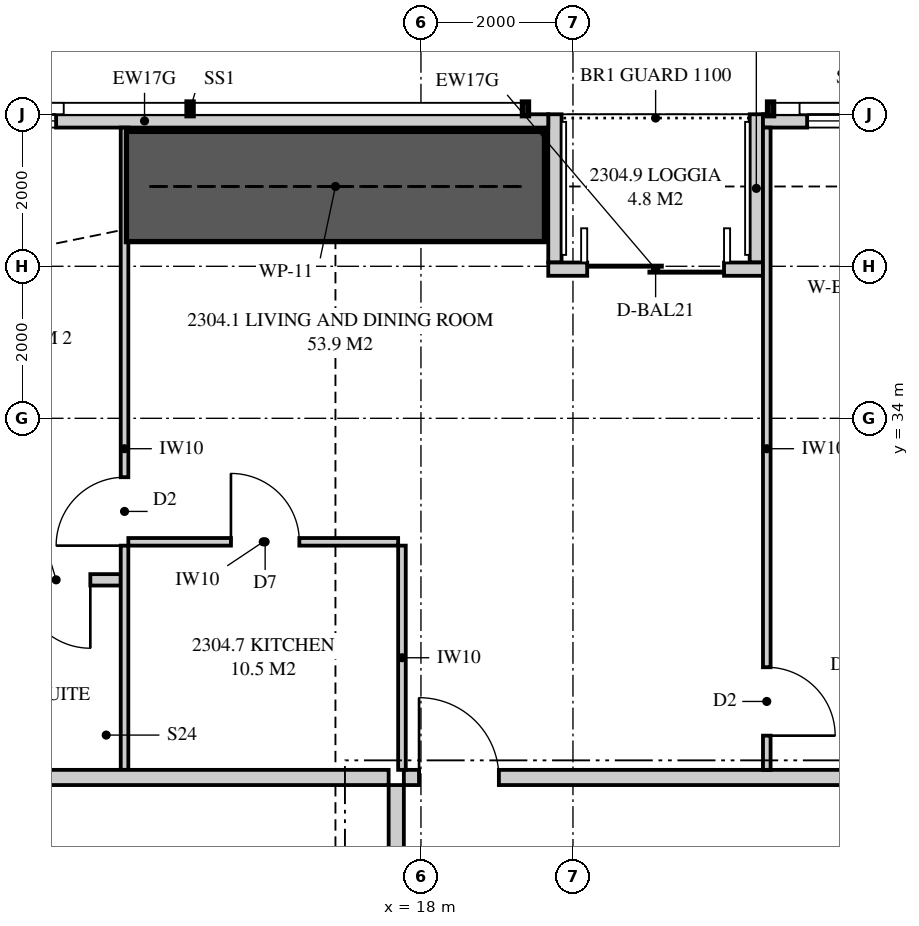
"""IFC4 building model, lengths in metres.
Left out: names, types, materials, properties, quantities, classifications, styles, units other than length and angle.
Written with IfcOpenShell. Run it as: python <this file> out.ifc"""

import sys

from ifc_helpers import new_model, si_unit, direction, frame, frame_2d, origin, place, context, subcontext, project, spatial, polyline, rectangle, outline, extrude, element, fill, save


model = new_model("IFC4")
c1 = context("Model", 3, precision=1e-05, world=origin(), true_north=direction((0.0, 1.0)))
c2 = subcontext(c1, "Body", "Model", "MODEL_VIEW")
j1 = project(units=[si_unit("LENGTHUNIT", "METRE"), si_unit("PLANEANGLEUNIT", "RADIAN")], contexts=[c1])
p1 = place(None, origin())
s1 = spatial("IfcSite", under=j1, at=p1, CompositionType="ELEMENT")
p2 = place(p1, origin())
s2 = spatial("IfcBuilding", under=s1, at=p2, CompositionType="ELEMENT")
p3 = place(p2, frame((0.0, 0.0, 88.1)))
s3 = spatial("IfcBuildingStorey", under=s2, at=p3, CompositionType="ELEMENT", Elevation=88.1)
p4 = place(p3, frame((30.675, 37.913, 0.0), z_axis=(0.0, 0.0, 1.0), x_axis=(-1.0, 0.0, 0.0)))
e1 = element("IfcWall", 1, at=p4, inside=s3, PredefinedType="SOLIDWALL", context=c2, shape_type="SweptSolid", body=[
    extrude(rectangle(XDim=8.175, YDim=0.175, at=frame_2d((4.087, 0.0))), origin(), (0.0, 0.0, 1.0), 2.15),
])
p5 = place(p4, frame((5.794, 0.0, 0.4)))
e2 = element("IfcOpeningElement", 2, at=p5, cuts=e1, PredefinedType="OPENING", context=c2, shape_type="SweptSolid", body=[
    extrude(rectangle(XDim=1.8, YDim=1.7, at=frame_2d((0.9, 0.85))), frame((0.0, 0.097, 0.0), z_axis=(0.0, -1.0, 0.0), x_axis=(1.0, 0.0, 0.0)), (0.0, 0.0, 1.0), 0.195),
])
p6 = place(p3, frame((19.675, 37.913, 0.0), z_axis=(0.0, 0.0, 1.0), x_axis=(-1.0, 0.0, 0.0)))
e3 = element("IfcWall", 3, at=p6, inside=s3, PredefinedType="SOLIDWALL", context=c2, shape_type="SweptSolid", body=[
    extrude(outline(polyline([(0.0, 0.0), (10.624, 0.0), (10.624, 3.11), (3.003, 3.11), (3.003, 2.15), (2.958, 2.15), (2.958, 3.11), (2.8, 3.11), (2.8, 2.15), (0.0, 2.15), (0.0, 0.0)])), frame((0.0, 0.087, 0.0), z_axis=(0.0, -1.0, 0.0), x_axis=(1.0, 0.0, 0.0)), (0.0, 0.0, 1.0), 0.175),
])
p7 = place(p6, frame((6.475, 0.0, 0.4)))
e4 = element("IfcOpeningElement", 4, at=p7, cuts=e3, PredefinedType="OPENING", context=c2, shape_type="SweptSolid", body=[
    extrude(rectangle(XDim=1.8, YDim=1.7, at=frame_2d((0.9, 0.85))), frame((0.0, 0.097, 0.0), z_axis=(0.0, -1.0, 0.0), x_axis=(1.0, 0.0, 0.0)), (0.0, 0.0, 1.0), 0.195),
])
p8 = place(p3, frame((22.5, 35.962, 0.0), z_axis=(0.0, 0.0, 1.0), x_axis=(-1.0, 0.0, 0.0)))
e5 = element("IfcWall", 5, at=p8, inside=s3, PredefinedType="SOLIDWALL", context=c2, shape_type="SweptSolid", body=[
    extrude(rectangle(XDim=2.825, YDim=0.175, at=frame_2d((1.413, 0.0))), origin(), (0.0, 0.0, 1.0), 3.11),
])
p9 = place(p8, frame((0.512, 0.0, 0.0)))
e6 = element("IfcOpeningElement", 6, at=p9, cuts=e5, PredefinedType="OPENING", context=c2, shape_type="SweptSolid", body=[
    extrude(rectangle(XDim=1.8, YDim=2.1, at=frame_2d((0.9, 1.05))), frame((0.0, 0.097, 0.0), z_axis=(0.0, -1.0, 0.0), x_axis=(1.0, 0.0, 0.0)), (0.0, 0.0, 1.0), 0.195),
])
for number, where, z_axis, x_axis in (
    (7, (22.413, 38.0, 0.0), (0.0, 0.0, 1.0), (0.0, -1.0, 0.0)),
    (8, (19.762, 38.0, 0.0), (0.0, 0.0, 1.0), (0.0, -1.0, 0.0)),
):
    element("IfcWall", number, at=place(p3, frame(where, z_axis=z_axis, x_axis=x_axis)), inside=s3, PredefinedType="SOLIDWALL", context=c2, shape_type="SweptSolid", body=[
        extrude(outline(polyline([(0.0, 0.0), (1.95, 0.0), (1.95, 3.11), (1.75, 3.11), (1.75, 2.15), (0.15, 2.15), (0.15, 3.11), (0.0, 3.11), (0.0, 0.0)])), frame((0.0, 0.087, 0.0), z_axis=(0.0, -1.0, 0.0), x_axis=(1.0, 0.0, 0.0)), (0.0, 0.0, 1.0), 0.175),
    ])
p10 = place(p3, frame((17.775, 29.275, 0.0), z_axis=(0.0, 0.0, 1.0), x_axis=(1.0, 0.0, 0.0)))
e9 = element("IfcWall", 9, at=p10, inside=s3, PredefinedType="PARTITIONING", context=c2, shape_type="SweptSolid", body=[
    extrude(rectangle(XDim=8.375, YDim=0.2, at=frame_2d((4.188, 0.0))), origin(), (0.0, 0.0, 1.0), 3.11),
])
p11 = place(p10, frame((0.2, 0.0, 0.0)))
e10 = element("IfcOpeningElement", 10, at=p11, cuts=e9, PredefinedType="OPENING", context=c2, shape_type="SweptSolid", body=[
    extrude(rectangle(XDim=1.05, YDim=2.2, at=frame_2d((0.525, 1.1))), frame((0.0, 0.11, 0.0), z_axis=(0.0, -1.0, 0.0), x_axis=(1.0, 0.0, 0.0)), (0.0, 0.0, 1.0), 0.22),
])
p12 = place(p3, frame((14.1, 37.825, 0.0), z_axis=(0.0, 0.0, 1.0), x_axis=(0.0, -1.0, 0.0)))
e11 = element("IfcWall", 11, at=p12, inside=s3, PredefinedType="PARTITIONING", context=c2, shape_type="SweptSolid", body=[
    extrude(outline(polyline([(0.0, 0.0), (8.45, 0.0), (8.45, 3.11), (2.219, 3.11), (2.219, 2.15), (0.463, 2.15), (0.463, 3.11), (0.0, 3.11), (0.0, 0.0)])), frame((0.0, 0.05, 0.0), z_axis=(0.0, -1.0, 0.0), x_axis=(1.0, 0.0, 0.0)), (0.0, 0.0, 1.0), 0.1),
])
p13 = place(p12, frame((4.6, 0.0, 0.0)))
e12 = element("IfcOpeningElement", 12, at=p13, cuts=e11, PredefinedType="OPENING", context=c2, shape_type="SweptSolid", body=[
    extrude(rectangle(XDim=0.9, YDim=2.1, at=frame_2d((0.45, 1.05))), frame((0.0, 0.06, 0.0), z_axis=(0.0, -1.0, 0.0), x_axis=(1.0, 0.0, 0.0)), (0.0, 0.0, 1.0), 0.12),
])
p14 = place(p3, frame((10.55, 31.875, 0.0), z_axis=(0.0, 0.0, 1.0), x_axis=(1.0, 0.0, 0.0)))
e13 = element("IfcWall", 13, at=p14, inside=s3, PredefinedType="PLUMBINGWALL", context=c2, shape_type="SweptSolid", body=[
    extrude(outline(polyline([(0.0, 0.0), (3.5, 0.0), (3.5, 3.11), (0.935, 3.11), (0.935, 2.51), (0.0, 2.51), (0.0, 3.11), (0.0, 0.0)])), frame((0.0, 0.075, 0.0), z_axis=(0.0, -1.0, 0.0), x_axis=(1.0, 0.0, 0.0)), (0.0, 0.0, 1.0), 0.15),
])
p15 = place(p14, frame((2.2, 0.0, 0.0)))
e14 = element("IfcOpeningElement", 14, at=p15, cuts=e13, PredefinedType="OPENING", context=c2, shape_type="SweptSolid", body=[
    extrude(rectangle(XDim=0.9, YDim=2.1, at=frame_2d((0.45, 1.05))), frame((0.0, 0.085, 0.0), z_axis=(0.0, -1.0, 0.0), x_axis=(1.0, 0.0, 0.0)), (0.0, 0.0, 1.0), 0.17),
])
p16 = place(p3, frame((22.55, 37.825, 0.0), z_axis=(0.0, 0.0, 1.0), x_axis=(0.0, -1.0, 0.0)))
e15 = element("IfcWall", 15, at=p16, inside=s3, PredefinedType="PARTITIONING", context=c2, shape_type="SweptSolid", body=[
    extrude(outline(polyline([(0.0, 0.0), (8.45, 0.0), (8.45, 3.11), (1.635, 3.11), (1.635, 2.15), (0.0, 2.15), (0.0, 3.11), (0.0, 0.0)])), frame((0.0, 0.05, 0.0), z_axis=(0.0, -1.0, 0.0), x_axis=(1.0, 0.0, 0.0)), (0.0, 0.0, 1.0), 0.1),
])
p17 = place(p16, frame((7.1, 0.0, 0.0)))
e16 = element("IfcOpeningElement", 16, at=p17, cuts=e15, PredefinedType="OPENING", context=c2, shape_type="SweptSolid", body=[
    extrude(rectangle(XDim=0.9, YDim=2.1, at=frame_2d((0.45, 1.05))), frame((0.0, 0.06, 0.0), z_axis=(0.0, -1.0, 0.0), x_axis=(1.0, 0.0, 0.0)), (0.0, 0.0, 1.0), 0.12),
])
p18 = place(p3, frame((14.15, 32.375, 0.0), z_axis=(0.0, 0.0, 1.0), x_axis=(1.0, 0.0, 0.0)))
e17 = element("IfcWall", 17, at=p18, inside=s3, PredefinedType="PARTITIONING", context=c2, shape_type="SweptSolid", body=[
    extrude(outline(polyline([(0.0, 0.0), (3.55, 0.0), (3.55, 3.11), (3.021, 3.11), (3.021, 2.531), (2.429, 2.531), (2.429, 3.11), (0.0, 3.11), (0.0, 0.0)])), frame((0.0, 0.05, 0.0), z_axis=(0.0, -1.0, 0.0), x_axis=(1.0, 0.0, 0.0)), (0.0, 0.0, 1.0), 0.1),
])
p19 = place(p18, frame((1.35, 0.0, 0.0)))
e18 = element("IfcOpeningElement", 18, at=p19, cuts=e17, PredefinedType="OPENING", context=c2, shape_type="SweptSolid", body=[
    extrude(rectangle(XDim=0.9, YDim=2.1, at=frame_2d((0.45, 1.05))), frame((0.0, 0.06, 0.0), z_axis=(0.0, -1.0, 0.0), x_axis=(1.0, 0.0, 0.0)), (0.0, 0.0, 1.0), 0.12),
])
p20 = place(p3, frame((17.75, 32.325, 0.0), z_axis=(0.0, 0.0, 1.0), x_axis=(0.0, -1.0, 0.0)))
e19 = element("IfcWall", 19, at=p20, inside=s3, PredefinedType="PARTITIONING", context=c2, shape_type="SweptSolid", body=[
    extrude(rectangle(XDim=2.95, YDim=0.1, at=frame_2d((1.475, 0.0))), origin(), (0.0, 0.0, 1.0), 3.11),
])
p21 = place(p3, frame((6.0, 29.275, 0.0), z_axis=(0.0, 0.0, 1.0), x_axis=(1.0, 0.0, 0.0)))
e20 = element("IfcWall", 20, at=p21, inside=s3, PredefinedType="PARTITIONING", context=c2, shape_type="SweptSolid", body=[
    extrude(outline(polyline([(0.0, 0.0), (11.575, 0.0), (11.575, 3.11), (11.221, 3.11), (11.221, 2.531), (10.529, 2.531), (10.529, 3.11), (5.51, 3.11), (5.51, 2.51), (2.978, 2.51), (2.978, 2.531), (2.565, 2.531), (2.565, 2.15), (0.721, 2.15), (0.721, 3.11), (0.0, 3.11), (0.0, 0.0)])), frame((0.0, 0.1, 0.0), z_axis=(0.0, -1.0, 0.0), x_axis=(1.0, 0.0, 0.0)), (0.0, 0.0, 1.0), 0.2),
])
p22 = place(p3, frame((17.675, 19.7, 0.0), z_axis=(0.0, 0.0, 1.0), x_axis=(0.0, 1.0, 0.0)))
e21 = element("IfcWall", 21, at=p22, inside=s3, PredefinedType="PARTITIONING", context=c2, shape_type="SweptSolid", body=[
    extrude(outline(polyline([(0.0, 0.0), (9.475, 0.0), (9.475, 3.11), (7.071, 3.11), (7.071, 2.531), (6.379, 2.531), (6.379, 3.11), (0.0, 3.11), (0.0, 0.0)])), frame((0.0, 0.1, 0.0), z_axis=(0.0, -1.0, 0.0), x_axis=(1.0, 0.0, 0.0)), (0.0, 0.0, 1.0), 0.2),
])
p23 = place(p3, frame((14.125, 37.05, 0.0), z_axis=(0.0, 0.0, 1.0), x_axis=(1.0, 0.0, 0.0)))
e22 = element("IfcWall", 22, at=p23, inside=s3, PredefinedType="SHEAR", context=c2, shape_type="SweptSolid", body=[
    extrude(rectangle(XDim=5.5, YDim=1.45, at=frame_2d((2.75, 0.0))), origin(), (0.0, 0.0, 1.0), 3.35),
])
p24 = place(p5, origin())
e23 = element("IfcWindow", 23, at=p24, inside=s3, PartitioningType="SINGLE_PANEL", PredefinedType="WINDOW", context=c2, shape_type="SweptSolid", body=[
    extrude(rectangle(XDim=1.8, YDim=1.7, at=frame_2d((0.9, 0.85))), frame((0.0, 0.03, 0.0), z_axis=(0.0, -1.0, 0.0), x_axis=(1.0, 0.0, 0.0)), (0.0, 0.0, 1.0), 0.06),
])
fill(e2, e23)
p25 = place(p9, origin())
e24 = element("IfcDoor", 24, at=p25, inside=s3, OperationType="SLIDING_TO_LEFT", PredefinedType="DOOR", context=c2, shape_type="SweptSolid", body=[
    extrude(rectangle(XDim=1.8, YDim=2.1, at=frame_2d((0.9, 1.05))), frame((0.0, 0.025, 0.0), z_axis=(0.0, -1.0, 0.0), x_axis=(1.0, 0.0, 0.0)), (0.0, 0.0, 1.0), 0.05),
])
fill(e6, e24)
p26 = place(p7, origin())
e25 = element("IfcWindow", 25, at=p26, inside=s3, PartitioningType="SINGLE_PANEL", PredefinedType="WINDOW", context=c2, shape_type="SweptSolid", body=[
    extrude(rectangle(XDim=1.8, YDim=1.7, at=frame_2d((0.9, 0.85))), frame((0.0, 0.03, 0.0), z_axis=(0.0, -1.0, 0.0), x_axis=(1.0, 0.0, 0.0)), (0.0, 0.0, 1.0), 0.06),
])
fill(e4, e25)
p27 = place(p11, origin())
e26 = element("IfcDoor", 26, at=p27, inside=s3, OperationType="SINGLE_SWING_LEFT", PredefinedType="DOOR", context=c2, shape_type="SweptSolid", body=[
    extrude(rectangle(XDim=1.05, YDim=2.2, at=frame_2d((0.525, 1.1))), frame((0.0, 0.025, 0.0), z_axis=(0.0, -1.0, 0.0), x_axis=(1.0, 0.0, 0.0)), (0.0, 0.0, 1.0), 0.05),
])
fill(e10, e26)
p28 = place(p13, frame((0.9, 0.0, 0.0), z_axis=(0.0, 0.0, 1.0), x_axis=(-1.0, 0.0, 0.0)))
e27 = element("IfcDoor", 27, at=p28, inside=s3, OperationType="SINGLE_SWING_LEFT", PredefinedType="DOOR", context=c2, shape_type="SweptSolid", body=[
    extrude(rectangle(XDim=0.9, YDim=2.1, at=frame_2d((0.45, 1.05))), frame((0.0, 0.025, 0.0), z_axis=(0.0, -1.0, 0.0), x_axis=(1.0, 0.0, 0.0)), (0.0, 0.0, 1.0), 0.05),
])
fill(e12, e27)
p29 = place(p15, frame((0.9, 0.0, 0.0), z_axis=(0.0, 0.0, 1.0), x_axis=(-1.0, 0.0, 0.0)))
e28 = element("IfcDoor", 28, at=p29, inside=s3, OperationType="SINGLE_SWING_LEFT", PredefinedType="DOOR", context=c2, shape_type="SweptSolid", body=[
    extrude(rectangle(XDim=0.9, YDim=2.1, at=frame_2d((0.45, 1.05))), frame((0.0, 0.025, 0.0), z_axis=(0.0, -1.0, 0.0), x_axis=(1.0, 0.0, 0.0)), (0.0, 0.0, 1.0), 0.05),
])
fill(e14, e28)
p30 = place(p17, origin())
e29 = element("IfcDoor", 29, at=p30, inside=s3, OperationType="SINGLE_SWING_RIGHT", PredefinedType="DOOR", context=c2, shape_type="SweptSolid", body=[
    extrude(rectangle(XDim=0.9, YDim=2.1, at=frame_2d((0.45, 1.05))), frame((0.0, 0.025, 0.0), z_axis=(0.0, -1.0, 0.0), x_axis=(1.0, 0.0, 0.0)), (0.0, 0.0, 1.0), 0.05),
])
fill(e16, e29)
p31 = place(p19, origin())
e30 = element("IfcDoor", 30, at=p31, inside=s3, OperationType="SINGLE_SWING_LEFT", PredefinedType="DOOR", context=c2, shape_type="SweptSolid", body=[
    extrude(rectangle(XDim=0.9, YDim=2.1, at=frame_2d((0.45, 1.05))), frame((0.0, 0.025, 0.0), z_axis=(0.0, -1.0, 0.0), x_axis=(1.0, 0.0, 0.0)), (0.0, 0.0, 1.0), 0.05),
])
fill(e18, e30)
save(model, sys.argv[1])
